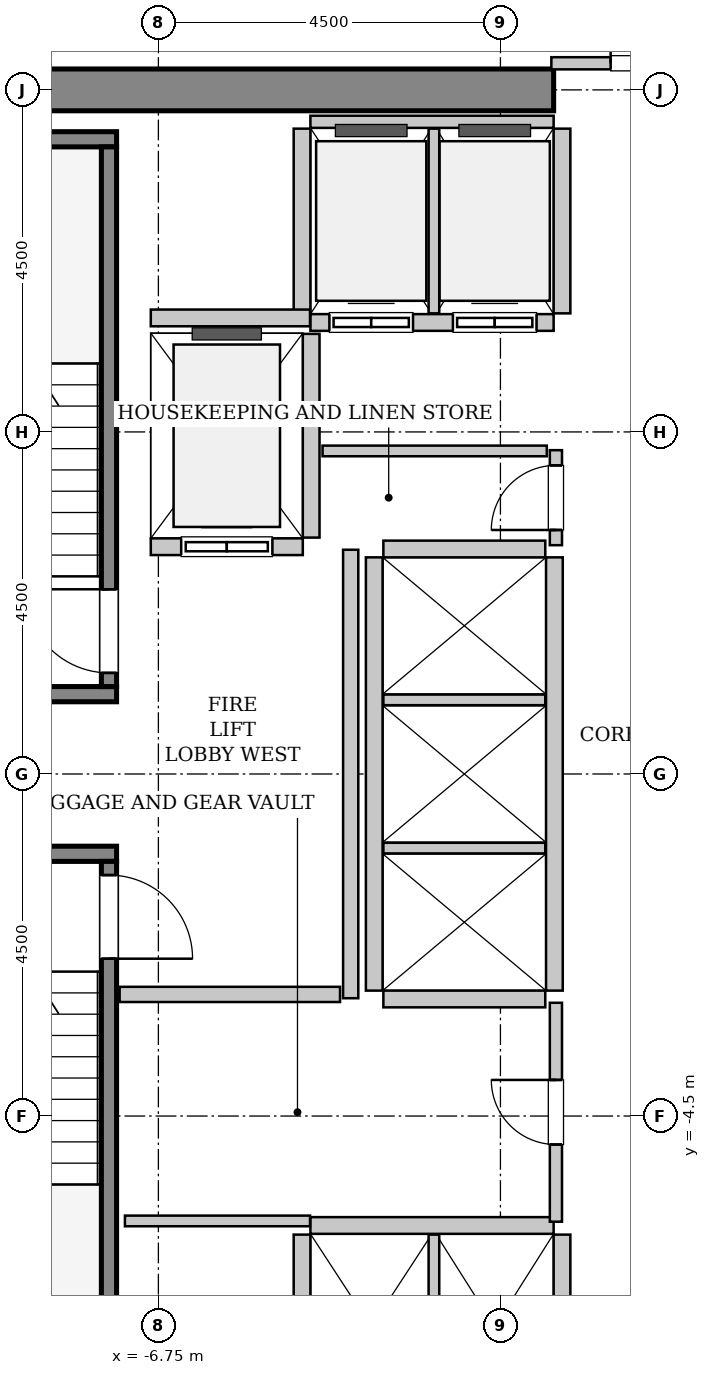
"""IFC4 building model, lengths in metres.
Left out: names, types, materials, properties, quantities, classifications, styles, units other than length and angle.
Written with IfcOpenShell. Run it as: python <this file> out.ifc"""

import sys

from ifc_helpers import new_model, si_unit, direction, frame, frame_2d, origin, place, context, subcontext, project, spatial, rectangle, extrude, source, transform, mapped, element, fill, save


model = new_model("IFC4")
c1 = context("Model", 3, precision=1e-05, world=origin(), true_north=direction((0.0, 1.0)))
c2 = subcontext(c1, "Body", "Model", "MODEL_VIEW")
j1 = project(units=[si_unit("LENGTHUNIT", "METRE"), si_unit("PLANEANGLEUNIT", "RADIAN")], contexts=[c1])
p1 = place(None, origin())
s1 = spatial("IfcSite", under=j1, at=p1, CompositionType="ELEMENT")
p2 = place(p1, origin())
s2 = spatial("IfcBuilding", under=s1, at=p2, CompositionType="ELEMENT")
p3 = place(p2, frame((0.0, 0.0, 117.4)))
s3 = spatial("IfcBuildingStorey", under=s2, at=p3, CompositionType="ELEMENT", Elevation=117.4)
m1 = source(origin(), c2, "Body", "SweptSolid", [
    extrude(rectangle(XDim=9.975, YDim=0.55, at=frame_2d((4.987, 0.0))), origin(), (0.0, 0.0, 1.0), 3.8),
])
p4 = place(p3, frame((-11.525, 9.0, 0.0), z_axis=(0.0, 0.0, 1.0), x_axis=(1.0, 0.0, 0.0)))
e1 = element("IfcWall", 1, at=p4, inside=s3, PredefinedType="SHEAR", context=c2, shape_type="MappedRepresentation", body=[
    mapped(m1, transform((0.0, 0.0, 0.0), x_axis=(1.0, 0.0, 0.0), y_axis=(0.0, 1.0, 0.0), z_axis=(0.0, 0.0, 1.0), scale=1.0)),
])
m2 = source(origin(), c2, "Body", "SweptSolid", [
    extrude(rectangle(XDim=3.4, YDim=0.2, at=frame_2d((1.7, 0.0))), origin(), (0.0, 0.0, 1.0), 3.8),
])
p5 = place(p3, frame((-7.3, 1.05, 0.0), z_axis=(0.0, 0.0, 1.0), x_axis=(-1.0, 0.0, 0.0)))
e2 = element("IfcWall", 2, at=p5, inside=s3, PredefinedType="SOLIDWALL", context=c2, shape_type="MappedRepresentation", body=[
    mapped(m2, transform((0.0, 0.0, 0.0), x_axis=(1.0, 0.0, 0.0), y_axis=(0.0, 1.0, 0.0), z_axis=(0.0, 0.0, 1.0), scale=1.0)),
])
m3 = source(origin(), c2, "Body", "SweptSolid", [
    extrude(rectangle(XDim=3.68, YDim=0.2, at=frame_2d((1.84, 0.0))), origin(), (0.0, 0.0, 1.0), 3.8),
])
p6 = place(p3, frame((-7.3, 8.35, 0.0), z_axis=(0.0, 0.0, 1.0), x_axis=(-1.0, 0.0, 0.0)))
e3 = element("IfcWall", 3, at=p6, inside=s3, PredefinedType="SOLIDWALL", context=c2, shape_type="MappedRepresentation", body=[
    mapped(m3, transform((0.0, 0.0, 0.0), x_axis=(1.0, 0.0, 0.0), y_axis=(0.0, 1.0, 0.0), z_axis=(0.0, 0.0, 1.0), scale=1.0)),
])
m4 = source(origin(), c2, "Body", "SweptSolid", [
    extrude(rectangle(XDim=7.1, YDim=0.2, at=frame_2d((3.55, 0.0))), origin(), (0.0, 0.0, 1.0), 3.8),
])
p7 = place(p3, frame((-7.4, 1.15, 0.0), z_axis=(0.0, 0.0, 1.0), x_axis=(0.0, 1.0, 0.0)))
e4 = element("IfcWall", 4, at=p7, inside=s3, PredefinedType="SOLIDWALL", context=c2, shape_type="MappedRepresentation", body=[
    mapped(m4, transform((0.0, 0.0, 0.0), x_axis=(1.0, 0.0, 0.0), y_axis=(0.0, 1.0, 0.0), z_axis=(0.0, 0.0, 1.0), scale=1.0)),
])
p8 = place(p7, frame((0.18, 0.0, 0.0)))
e5 = element("IfcOpeningElement", 5, at=p8, cuts=e4, PredefinedType="OPENING", context=c2, shape_type="SweptSolid", body=[
    extrude(rectangle(XDim=1.1, YDim=2.15, at=frame_2d((0.55, 1.075))), frame((0.0, 0.11, 0.0), z_axis=(0.0, -1.0, 0.0), x_axis=(1.0, 0.0, 0.0)), (0.0, 0.0, 1.0), 0.22),
])
p9 = place(p3, frame((-10.7, -1.05, 0.0), z_axis=(0.0, 0.0, 1.0), x_axis=(1.0, 0.0, 0.0)))
e6 = element("IfcWall", 6, at=p9, inside=s3, PredefinedType="SOLIDWALL", context=c2, shape_type="MappedRepresentation", body=[
    mapped(m2, transform((0.0, 0.0, 0.0), x_axis=(1.0, 0.0, 0.0), y_axis=(0.0, 1.0, 0.0), z_axis=(0.0, 0.0, 1.0), scale=1.0)),
])
p10 = place(p3, frame((-7.4, -1.15, 0.0), z_axis=(0.0, 0.0, 1.0), x_axis=(0.0, -1.0, 0.0)))
e7 = element("IfcWall", 7, at=p10, inside=s3, PredefinedType="SOLIDWALL", context=c2, shape_type="MappedRepresentation", body=[
    mapped(m4, transform((0.0, 0.0, 0.0), x_axis=(1.0, 0.0, 0.0), y_axis=(0.0, 1.0, 0.0), z_axis=(0.0, 0.0, 1.0), scale=1.0)),
])
p11 = place(p10, frame((0.18, 0.0, 0.0)))
e8 = element("IfcOpeningElement", 8, at=p11, cuts=e7, PredefinedType="OPENING", context=c2, shape_type="SweptSolid", body=[
    extrude(rectangle(XDim=1.1, YDim=2.15, at=frame_2d((0.55, 1.075))), frame((0.0, 0.11, 0.0), z_axis=(0.0, -1.0, 0.0), x_axis=(1.0, 0.0, 0.0)), (0.0, 0.0, 1.0), 0.22),
])
m5 = source(origin(), c2, "Body", "SweptSolid", [
    extrude(rectangle(XDim=2.0, YDim=0.22, at=frame_2d((1.0, 0.0))), origin(), (0.0, 0.0, 1.0), 3.535),
])
p12 = place(p3, frame((-6.85, 2.99, 0.0), z_axis=(0.0, 0.0, 1.0), x_axis=(1.0, 0.0, 0.0)))
e9 = element("IfcWall", 9, at=p12, inside=s3, PredefinedType="SOLIDWALL", context=c2, shape_type="MappedRepresentation", body=[
    mapped(m5, transform((0.0, 0.0, 0.0), x_axis=(1.0, 0.0, 0.0), y_axis=(0.0, 1.0, 0.0), z_axis=(0.0, 0.0, 1.0), scale=1.0)),
])
p13 = place(p12, frame((0.4, 0.0, 0.0)))
e10 = element("IfcOpeningElement", 10, at=p13, cuts=e9, PredefinedType="OPENING", context=c2, shape_type="SweptSolid", body=[
    extrude(rectangle(XDim=1.2, YDim=2.2, at=frame_2d((0.6, 1.1))), frame((0.0, 0.12, 0.0), z_axis=(0.0, -1.0, 0.0), x_axis=(1.0, 0.0, 0.0)), (0.0, 0.0, 1.0), 0.24),
])
m6 = source(origin(), c2, "Body", "SweptSolid", [
    extrude(rectangle(XDim=2.68, YDim=0.22, at=frame_2d((1.34, 0.0))), origin(), (0.0, 0.0, 1.0), 3.535),
])
p14 = place(p3, frame((-4.74, 3.11, 0.0), z_axis=(0.0, 0.0, 1.0), x_axis=(0.0, 1.0, 0.0)))
e11 = element("IfcWall", 11, at=p14, inside=s3, PredefinedType="SOLIDWALL", context=c2, shape_type="MappedRepresentation", body=[
    mapped(m6, transform((0.0, 0.0, 0.0), x_axis=(1.0, 0.0, 0.0), y_axis=(0.0, 1.0, 0.0), z_axis=(0.0, 0.0, 1.0), scale=1.0)),
])
m7 = source(origin(), c2, "Body", "SweptSolid", [
    extrude(rectangle(XDim=3.2, YDim=0.22, at=frame_2d((1.6, 0.0))), origin(), (0.0, 0.0, 1.0), 3.535),
])
p15 = place(p3, frame((-4.75, 5.94, 0.0), z_axis=(0.0, 0.0, 1.0), x_axis=(1.0, 0.0, 0.0)))
e12 = element("IfcWall", 12, at=p15, inside=s3, PredefinedType="SOLIDWALL", context=c2, shape_type="MappedRepresentation", body=[
    mapped(m7, transform((0.0, 0.0, 0.0), x_axis=(1.0, 0.0, 0.0), y_axis=(0.0, 1.0, 0.0), z_axis=(0.0, 0.0, 1.0), scale=1.0)),
])
p16 = place(p15, frame((0.25, 0.0, 0.0)))
e13 = element("IfcOpeningElement", 13, at=p16, cuts=e12, PredefinedType="OPENING", context=c2, shape_type="SweptSolid", body=[
    extrude(rectangle(XDim=1.1, YDim=2.2, at=frame_2d((0.55, 1.1))), frame((0.0, 0.12, 0.0), z_axis=(0.0, -1.0, 0.0), x_axis=(1.0, 0.0, 0.0)), (0.0, 0.0, 1.0), 0.24),
])
p17 = place(p15, frame((1.875, 0.0, 0.0)))
e14 = element("IfcOpeningElement", 14, at=p17, cuts=e12, PredefinedType="OPENING", context=c2, shape_type="SweptSolid", body=[
    extrude(rectangle(XDim=1.1, YDim=2.2, at=frame_2d((0.55, 1.1))), frame((0.0, 0.12, 0.0), z_axis=(0.0, -1.0, 0.0), x_axis=(1.0, 0.0, 0.0)), (0.0, 0.0, 1.0), 0.24),
])
m8 = source(origin(), c2, "Body", "SweptSolid", [
    extrude(rectangle(XDim=3.2, YDim=0.16, at=frame_2d((1.6, 0.0))), origin(), (0.0, 0.0, 1.0), 2.425),
])
p18 = place(p3, frame((-1.55, 8.58, 0.0), z_axis=(0.0, 0.0, 1.0), x_axis=(-1.0, 0.0, 0.0)))
e15 = element("IfcWall", 15, at=p18, inside=s3, PredefinedType="PARTITIONING", context=c2, shape_type="MappedRepresentation", body=[
    mapped(m8, transform((0.0, 0.0, 0.0), x_axis=(1.0, 0.0, 0.0), y_axis=(0.0, 1.0, 0.0), z_axis=(0.0, 0.0, 1.0), scale=1.0)),
])
m9 = source(origin(), c2, "Body", "SweptSolid", [
    extrude(rectangle(XDim=2.43, YDim=0.22, at=frame_2d((1.215, 0.0))), origin(), (0.0, 0.0, 1.0), 3.535),
])
p19 = place(p3, frame((-4.86, 8.49, 0.0), z_axis=(0.0, 0.0, 1.0), x_axis=(0.0, -1.0, 0.0)))
e16 = element("IfcWall", 16, at=p19, inside=s3, PredefinedType="SOLIDWALL", context=c2, shape_type="MappedRepresentation", body=[
    mapped(m9, transform((0.0, 0.0, 0.0), x_axis=(1.0, 0.0, 0.0), y_axis=(0.0, 1.0, 0.0), z_axis=(0.0, 0.0, 1.0), scale=1.0)),
])
m10 = source(origin(), c2, "Body", "SweptSolid", [
    extrude(rectangle(XDim=2.43, YDim=0.14, at=frame_2d((1.215, 0.0))), origin(), (0.0, 0.0, 1.0), 3.535),
])
p20 = place(p3, frame((-3.125, 6.06, 0.0), z_axis=(0.0, 0.0, 1.0), x_axis=(0.0, 1.0, 0.0)))
e17 = element("IfcWall", 17, at=p20, inside=s3, PredefinedType="PARTITIONING", context=c2, shape_type="MappedRepresentation", body=[
    mapped(m10, transform((0.0, 0.0, 0.0), x_axis=(1.0, 0.0, 0.0), y_axis=(0.0, 1.0, 0.0), z_axis=(0.0, 0.0, 1.0), scale=1.0)),
])
p21 = place(p3, frame((-1.44, 6.06, 0.0), z_axis=(0.0, 0.0, 1.0), x_axis=(0.0, 1.0, 0.0)))
e18 = element("IfcWall", 18, at=p21, inside=s3, PredefinedType="SOLIDWALL", context=c2, shape_type="MappedRepresentation", body=[
    mapped(m9, transform((0.0, 0.0, 0.0), x_axis=(1.0, 0.0, 0.0), y_axis=(0.0, 1.0, 0.0), z_axis=(0.0, 0.0, 1.0), scale=1.0)),
])
p22 = place(p3, frame((-1.55, -5.94, 0.0), z_axis=(0.0, 0.0, 1.0), x_axis=(-1.0, 0.0, 0.0)))
e19 = element("IfcWall", 19, at=p22, inside=s3, PredefinedType="SOLIDWALL", context=c2, shape_type="MappedRepresentation", body=[
    mapped(m7, transform((0.0, 0.0, 0.0), x_axis=(1.0, 0.0, 0.0), y_axis=(0.0, 1.0, 0.0), z_axis=(0.0, 0.0, 1.0), scale=1.0)),
])
p23 = place(p3, frame((-4.86, -6.06, 0.0), z_axis=(0.0, 0.0, 1.0), x_axis=(0.0, -1.0, 0.0)))
e20 = element("IfcWall", 20, at=p23, inside=s3, PredefinedType="SOLIDWALL", context=c2, shape_type="MappedRepresentation", body=[
    mapped(m9, transform((0.0, 0.0, 0.0), x_axis=(1.0, 0.0, 0.0), y_axis=(0.0, 1.0, 0.0), z_axis=(0.0, 0.0, 1.0), scale=1.0)),
])
p24 = place(p3, frame((-3.125, -8.49, 0.0), z_axis=(0.0, 0.0, 1.0), x_axis=(0.0, 1.0, 0.0)))
e21 = element("IfcWall", 21, at=p24, inside=s3, PredefinedType="PARTITIONING", context=c2, shape_type="MappedRepresentation", body=[
    mapped(m10, transform((0.0, 0.0, 0.0), x_axis=(1.0, 0.0, 0.0), y_axis=(0.0, 1.0, 0.0), z_axis=(0.0, 0.0, 1.0), scale=1.0)),
])
p25 = place(p3, frame((-1.44, -8.49, 0.0), z_axis=(0.0, 0.0, 1.0), x_axis=(0.0, 1.0, 0.0)))
e22 = element("IfcWall", 22, at=p25, inside=s3, PredefinedType="SOLIDWALL", context=c2, shape_type="MappedRepresentation", body=[
    mapped(m9, transform((0.0, 0.0, 0.0), x_axis=(1.0, 0.0, 0.0), y_axis=(0.0, 1.0, 0.0), z_axis=(0.0, 0.0, 1.0), scale=1.0)),
])
m11 = source(origin(), c2, "Body", "SweptSolid", [
    extrude(rectangle(XDim=5.7, YDim=0.22, at=frame_2d((2.85, 0.0))), origin(), (0.0, 0.0, 1.0), 3.535),
])
for number, where, z_axis, x_axis in (
    (23, (-1.54, -2.85, 0.0), (0.0, 0.0, 1.0), (0.0, 1.0, 0.0)),
    (24, (-3.91, 2.85, 0.0), (0.0, 0.0, 1.0), (0.0, -1.0, 0.0)),
):
    element("IfcWall", number, at=place(p3, frame(where, z_axis=z_axis, x_axis=x_axis)), inside=s3, PredefinedType="SOLIDWALL", context=c2, shape_type="MappedRepresentation", body=[
        mapped(m11, transform((0.0, 0.0, 0.0), x_axis=(1.0, 0.0, 0.0), y_axis=(0.0, 1.0, 0.0), z_axis=(0.0, 0.0, 1.0), scale=1.0)),
    ])
m12 = source(origin(), c2, "Body", "SweptSolid", [
    extrude(rectangle(XDim=2.13, YDim=0.22, at=frame_2d((1.065, 0.0))), origin(), (0.0, 0.0, 1.0), 3.535),
])
p26 = place(p3, frame((-3.79, -2.96, 0.0), z_axis=(0.0, 0.0, 1.0), x_axis=(1.0, 0.0, 0.0)))
e25 = element("IfcWall", 25, at=p26, inside=s3, PredefinedType="SOLIDWALL", context=c2, shape_type="MappedRepresentation", body=[
    mapped(m12, transform((0.0, 0.0, 0.0), x_axis=(1.0, 0.0, 0.0), y_axis=(0.0, 1.0, 0.0), z_axis=(0.0, 0.0, 1.0), scale=1.0)),
])
m13 = source(origin(), c2, "Body", "SweptSolid", [
    extrude(rectangle(XDim=2.13, YDim=0.14, at=frame_2d((1.065, 0.0))), origin(), (0.0, 0.0, 1.0), 3.535),
])
for number, where, z_axis, x_axis in (
    (26, (-3.79, -0.975, 0.0), (0.0, 0.0, 1.0), (1.0, 0.0, 0.0)),
    (27, (-3.79, 0.975, 0.0), (0.0, 0.0, 1.0), (1.0, 0.0, 0.0)),
):
    element("IfcWall", number, at=place(p3, frame(where, z_axis=z_axis, x_axis=x_axis)), inside=s3, PredefinedType="PARTITIONING", context=c2, shape_type="MappedRepresentation", body=[
        mapped(m13, transform((0.0, 0.0, 0.0), x_axis=(1.0, 0.0, 0.0), y_axis=(0.0, 1.0, 0.0), z_axis=(0.0, 0.0, 1.0), scale=1.0)),
    ])
p27 = place(p3, frame((-1.66, 2.96, 0.0), z_axis=(0.0, 0.0, 1.0), x_axis=(-1.0, 0.0, 0.0)))
e28 = element("IfcWall", 28, at=p27, inside=s3, PredefinedType="SOLIDWALL", context=c2, shape_type="MappedRepresentation", body=[
    mapped(m12, transform((0.0, 0.0, 0.0), x_axis=(1.0, 0.0, 0.0), y_axis=(0.0, 1.0, 0.0), z_axis=(0.0, 0.0, 1.0), scale=1.0)),
])
m14 = source(origin(), c2, "Body", "SweptSolid", [
    extrude(rectangle(XDim=2.095, YDim=0.22, at=frame_2d((1.048, 0.0))), origin(), (0.0, 0.0, 1.0), 3.535),
])
p28 = place(p3, frame((-6.85, 6.0, 0.0), z_axis=(0.0, 0.0, 1.0), x_axis=(1.0, 0.0, 0.0)))
e29 = element("IfcWall", 29, at=p28, inside=s3, PredefinedType="SOLIDWALL", context=c2, shape_type="MappedRepresentation", body=[
    mapped(m14, transform((0.0, 0.0, 0.0), x_axis=(1.0, 0.0, 0.0), y_axis=(0.0, 1.0, 0.0), z_axis=(0.0, 0.0, 1.0), scale=1.0)),
])
m15 = source(origin(), c2, "Body", "SweptSolid", [
    extrude(rectangle(XDim=5.9, YDim=0.2, at=frame_2d((2.95, 0.0))), origin(), (0.0, 0.0, 1.0), 3.535),
])
p29 = place(p3, frame((-4.22, -2.95, 0.0), z_axis=(0.0, 0.0, 1.0), x_axis=(0.0, 1.0, 0.0)))
e30 = element("IfcWall", 30, at=p29, inside=s3, PredefinedType="PARTITIONING", context=c2, shape_type="MappedRepresentation", body=[
    mapped(m15, transform((0.0, 0.0, 0.0), x_axis=(1.0, 0.0, 0.0), y_axis=(0.0, 1.0, 0.0), z_axis=(0.0, 0.0, 1.0), scale=1.0)),
])
m16 = source(origin(), c2, "Body", "SweptSolid", [
    extrude(rectangle(XDim=2.9, YDim=0.2, at=frame_2d((1.45, 0.0))), origin(), (0.0, 0.0, 1.0), 3.535),
])
p30 = place(p3, frame((-7.26, -2.9, 0.0), z_axis=(0.0, 0.0, 1.0), x_axis=(1.0, 0.0, 0.0)))
e31 = element("IfcWall", 31, at=p30, inside=s3, PredefinedType="PARTITIONING", context=c2, shape_type="MappedRepresentation", body=[
    mapped(m16, transform((0.0, 0.0, 0.0), x_axis=(1.0, 0.0, 0.0), y_axis=(0.0, 1.0, 0.0), z_axis=(0.0, 0.0, 1.0), scale=1.0)),
])
m17 = source(origin(), c2, "Body", "SweptSolid", [
    extrude(rectangle(XDim=3.16, YDim=0.16, at=frame_2d((1.58, 0.0))), origin(), (0.0, 0.0, 1.0), 2.425),
])
p31 = place(p3, frame((-1.58, 9.35, 0.0), z_axis=(0.0, 0.0, 1.0), x_axis=(1.0, 0.0, 0.0)))
e32 = element("IfcWall", 32, at=p31, inside=s3, PredefinedType="PARTITIONING", context=c2, shape_type="MappedRepresentation", body=[
    mapped(m17, transform((0.0, 0.0, 0.0), x_axis=(1.0, 0.0, 0.0), y_axis=(0.0, 1.0, 0.0), z_axis=(0.0, 0.0, 1.0), scale=1.0)),
])
p32 = place(p31, frame((0.78, 0.0, 0.0)))
e33 = element("IfcOpeningElement", 33, at=p32, cuts=e32, PredefinedType="OPENING", context=c2, shape_type="SweptSolid", body=[
    extrude(rectangle(XDim=1.6, YDim=2.3, at=frame_2d((0.8, 1.15))), frame((0.0, 0.09, 0.0), z_axis=(0.0, -1.0, 0.0), x_axis=(1.0, 0.0, 0.0)), (0.0, 0.0, 1.0), 0.18),
])
m18 = source(origin(), c2, "Body", "SweptSolid", [
    extrude(rectangle(XDim=1.25, YDim=0.16, at=frame_2d((0.625, 0.0))), origin(), (0.0, 0.0, 1.0), 3.535),
])
p33 = place(p3, frame((-1.52, 3.01, 0.0), z_axis=(0.0, 0.0, 1.0), x_axis=(0.0, 1.0, 0.0)))
e34 = element("IfcWall", 34, at=p33, inside=s3, PredefinedType="PARTITIONING", context=c2, shape_type="MappedRepresentation", body=[
    mapped(m18, transform((0.0, 0.0, 0.0), x_axis=(1.0, 0.0, 0.0), y_axis=(0.0, 1.0, 0.0), z_axis=(0.0, 0.0, 1.0), scale=1.0)),
])
p34 = place(p33, frame((0.2, 0.0, 0.0)))
e35 = element("IfcOpeningElement", 35, at=p34, cuts=e34, PredefinedType="OPENING", context=c2, shape_type="SweptSolid", body=[
    extrude(rectangle(XDim=0.85, YDim=2.1, at=frame_2d((0.425, 1.05))), frame((0.0, 0.09, 0.0), z_axis=(0.0, -1.0, 0.0), x_axis=(1.0, 0.0, 0.0)), (0.0, 0.0, 1.0), 0.18),
])
m19 = source(origin(), c2, "Body", "SweptSolid", [
    extrude(rectangle(XDim=2.95, YDim=0.14, at=frame_2d((1.475, 0.0))), origin(), (0.0, 0.0, 1.0), 3.535),
])
p35 = place(p3, frame((-4.59, 4.25, 0.0), z_axis=(0.0, 0.0, 1.0), x_axis=(1.0, 0.0, 0.0)))
e36 = element("IfcWall", 36, at=p35, inside=s3, PredefinedType="PARTITIONING", context=c2, shape_type="MappedRepresentation", body=[
    mapped(m19, transform((0.0, 0.0, 0.0), x_axis=(1.0, 0.0, 0.0), y_axis=(0.0, 1.0, 0.0), z_axis=(0.0, 0.0, 1.0), scale=1.0)),
])
m20 = source(origin(), c2, "Body", "SweptSolid", [
    extrude(rectangle(XDim=2.88, YDim=0.16, at=frame_2d((1.44, 0.0))), origin(), (0.0, 0.0, 1.0), 3.535),
])
p36 = place(p3, frame((-1.52, -5.89, 0.0), z_axis=(0.0, 0.0, 1.0), x_axis=(0.0, 1.0, 0.0)))
e37 = element("IfcWall", 37, at=p36, inside=s3, PredefinedType="PARTITIONING", context=c2, shape_type="MappedRepresentation", body=[
    mapped(m20, transform((0.0, 0.0, 0.0), x_axis=(1.0, 0.0, 0.0), y_axis=(0.0, 1.0, 0.0), z_axis=(0.0, 0.0, 1.0), scale=1.0)),
])
p37 = place(p36, frame((1.015, 0.0, 0.0)))
e38 = element("IfcOpeningElement", 38, at=p37, cuts=e37, PredefinedType="OPENING", context=c2, shape_type="SweptSolid", body=[
    extrude(rectangle(XDim=0.85, YDim=2.1, at=frame_2d((0.425, 1.05))), frame((0.0, 0.09, 0.0), z_axis=(0.0, -1.0, 0.0), x_axis=(1.0, 0.0, 0.0)), (0.0, 0.0, 1.0), 0.18),
])
m21 = source(origin(), c2, "Body", "SweptSolid", [
    extrude(rectangle(XDim=2.435, YDim=0.14, at=frame_2d((1.218, 0.0))), origin(), (0.0, 0.0, 1.0), 3.535),
])
p38 = place(p3, frame((-7.19, -5.88, 0.0), z_axis=(0.0, 0.0, 1.0), x_axis=(1.0, 0.0, 0.0)))
e39 = element("IfcWall", 39, at=p38, inside=s3, PredefinedType="PARTITIONING", context=c2, shape_type="MappedRepresentation", body=[
    mapped(m21, transform((0.0, 0.0, 0.0), x_axis=(1.0, 0.0, 0.0), y_axis=(0.0, 1.0, 0.0), z_axis=(0.0, 0.0, 1.0), scale=1.0)),
])
m22 = source(origin(), c2, "Body", "SweptSolid", [
    extrude(rectangle(XDim=1.1, YDim=2.15, at=frame_2d((0.55, 1.075))), frame((0.0, 0.025, 0.0), z_axis=(0.0, -1.0, 0.0), x_axis=(1.0, 0.0, 0.0)), (0.0, 0.0, 1.0), 0.05),
])
p39 = place(p8, origin())
e40 = element("IfcDoor", 40, at=p39, inside=s3, OperationType="SINGLE_SWING_RIGHT", PredefinedType="DOOR", context=c2, shape_type="MappedRepresentation", body=[
    mapped(m22, transform((0.0, 0.0, 0.0), x_axis=(1.0, 0.0, 0.0), y_axis=(0.0, 1.0, 0.0), z_axis=(0.0, 0.0, 1.0), scale=1.0)),
])
fill(e5, e40)
p40 = place(p11, origin())
e41 = element("IfcDoor", 41, at=p40, inside=s3, OperationType="SINGLE_SWING_RIGHT", PredefinedType="DOOR", context=c2, shape_type="MappedRepresentation", body=[
    mapped(m22, transform((0.0, 0.0, 0.0), x_axis=(1.0, 0.0, 0.0), y_axis=(0.0, 1.0, 0.0), z_axis=(0.0, 0.0, 1.0), scale=1.0)),
])
fill(e8, e41)
m23 = source(origin(), c2, "Body", "SweptSolid", [
    extrude(rectangle(XDim=1.2, YDim=2.2, at=frame_2d((0.6, 1.1))), frame((0.0, 0.025, 0.0), z_axis=(0.0, -1.0, 0.0), x_axis=(1.0, 0.0, 0.0)), (0.0, 0.0, 1.0), 0.05),
])
p41 = place(p13, origin())
e42 = element("IfcDoor", 42, at=p41, inside=s3, OperationType="SLIDING_TO_LEFT", PredefinedType="DOOR", context=c2, shape_type="MappedRepresentation", body=[
    mapped(m23, transform((0.0, 0.0, 0.0), x_axis=(1.0, 0.0, 0.0), y_axis=(0.0, 1.0, 0.0), z_axis=(0.0, 0.0, 1.0), scale=1.0)),
])
fill(e10, e42)
m24 = source(origin(), c2, "Body", "SweptSolid", [
    extrude(rectangle(XDim=1.1, YDim=2.2, at=frame_2d((0.55, 1.1))), frame((0.0, 0.025, 0.0), z_axis=(0.0, -1.0, 0.0), x_axis=(1.0, 0.0, 0.0)), (0.0, 0.0, 1.0), 0.05),
])
p42 = place(p16, origin())
e43 = element("IfcDoor", 43, at=p42, inside=s3, OperationType="DOUBLE_DOOR_SLIDING", PredefinedType="DOOR", context=c2, shape_type="MappedRepresentation", body=[
    mapped(m24, transform((0.0, 0.0, 0.0), x_axis=(1.0, 0.0, 0.0), y_axis=(0.0, 1.0, 0.0), z_axis=(0.0, 0.0, 1.0), scale=1.0)),
])
fill(e13, e43)
p43 = place(p17, origin())
e44 = element("IfcDoor", 44, at=p43, inside=s3, OperationType="DOUBLE_DOOR_SLIDING", PredefinedType="DOOR", context=c2, shape_type="MappedRepresentation", body=[
    mapped(m24, transform((0.0, 0.0, 0.0), x_axis=(1.0, 0.0, 0.0), y_axis=(0.0, 1.0, 0.0), z_axis=(0.0, 0.0, 1.0), scale=1.0)),
])
fill(e14, e44)
m25 = source(origin(), c2, "Body", "SweptSolid", [
    extrude(rectangle(XDim=1.6, YDim=2.3, at=frame_2d((0.8, 1.15))), frame((0.0, 0.025, 0.0), z_axis=(0.0, -1.0, 0.0), x_axis=(1.0, 0.0, 0.0)), (0.0, 0.0, 1.0), 0.05),
])
p44 = place(p32, origin())
e45 = element("IfcDoor", 45, at=p44, inside=s3, OperationType="DOUBLE_DOOR_SINGLE_SWING", PredefinedType="DOOR", context=c2, shape_type="MappedRepresentation", body=[
    mapped(m25, transform((0.0, 0.0, 0.0), x_axis=(1.0, 0.0, 0.0), y_axis=(0.0, 1.0, 0.0), z_axis=(0.0, 0.0, 1.0), scale=1.0)),
])
fill(e33, e45)
m26 = source(origin(), c2, "Body", "SweptSolid", [
    extrude(rectangle(XDim=0.85, YDim=2.1, at=frame_2d((0.425, 1.05))), frame((0.0, 0.025, 0.0), z_axis=(0.0, -1.0, 0.0), x_axis=(1.0, 0.0, 0.0)), (0.0, 0.0, 1.0), 0.05),
])
p45 = place(p34, origin())
e46 = element("IfcDoor", 46, at=p45, inside=s3, OperationType="SINGLE_SWING_LEFT", PredefinedType="DOOR", context=c2, shape_type="MappedRepresentation", body=[
    mapped(m26, transform((0.0, 0.0, 0.0), x_axis=(1.0, 0.0, 0.0), y_axis=(0.0, 1.0, 0.0), z_axis=(0.0, 0.0, 1.0), scale=1.0)),
])
fill(e35, e46)
p46 = place(p37, origin())
e47 = element("IfcDoor", 47, at=p46, inside=s3, OperationType="SINGLE_SWING_RIGHT", PredefinedType="DOOR", context=c2, shape_type="MappedRepresentation", body=[
    mapped(m26, transform((0.0, 0.0, 0.0), x_axis=(1.0, 0.0, 0.0), y_axis=(0.0, 1.0, 0.0), z_axis=(0.0, 0.0, 1.0), scale=1.0)),
])
fill(e38, e47)
save(model, sys.argv[1])
